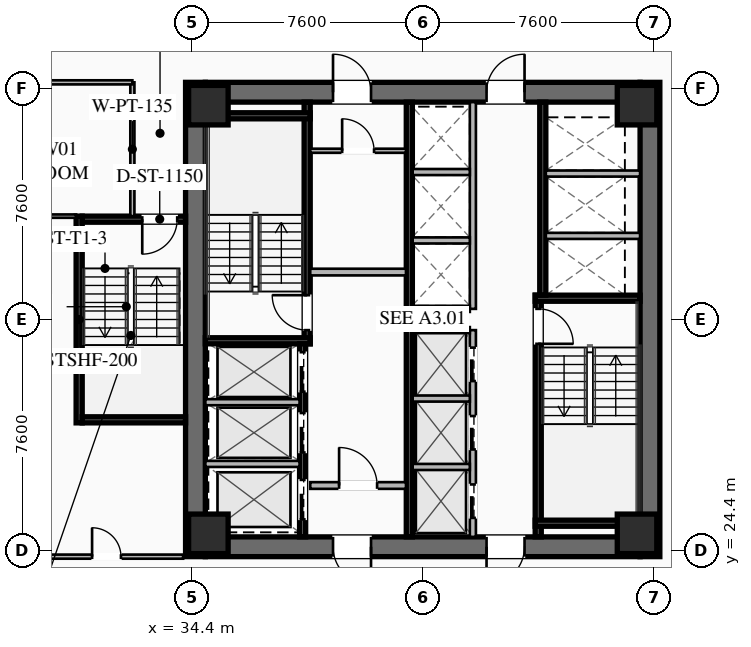
"""IFC4 building model, lengths in metres.
Left out: names, types, materials, properties, quantities, classifications, styles, units other than length and angle.
Written with IfcOpenShell. Run it as: python <this file> out.ifc"""

import sys

from ifc_helpers import new_model, si_unit, direction, frame, frame_2d, origin, origin_2d, place, context, subcontext, project, spatial, rectangle, hollow_rectangle, extrude, element, fill, save


model = new_model("IFC4")
c1 = context("Model", 3, precision=1e-05, world=origin(), true_north=direction((0.0, 1.0)))
c2 = subcontext(c1, "Body", "Model", "MODEL_VIEW")
j1 = project(units=[si_unit("LENGTHUNIT", "METRE"), si_unit("PLANEANGLEUNIT", "RADIAN")], contexts=[c1])
p1 = place(None, origin())
s1 = spatial("IfcSite", under=j1, at=p1, CompositionType="ELEMENT")
p2 = place(p1, origin())
s2 = spatial("IfcBuilding", under=s1, at=p2, CompositionType="ELEMENT")
p3 = place(p2, frame((0.0, 0.0, 77.85)))
s3 = spatial("IfcBuildingStorey", under=s2, at=p3, CompositionType="ELEMENT", Elevation=77.85)
for number, where, z_axis, x_axis in (
    (1, (34.525, 24.2, 0.0), (0.0, 0.0, 1.0), (0.0, 1.0, 0.0)),
    (2, (49.475, 39.8, 0.0), (0.0, 0.0, 1.0), (0.0, -1.0, 0.0)),
):
    element("IfcWall", number, at=place(p3, frame(where, z_axis=z_axis, x_axis=x_axis)), inside=s3, PredefinedType="SHEAR", context=c2, shape_type="SweptSolid", body=[
        extrude(rectangle(XDim=15.6, YDim=0.65, at=frame_2d((7.8, 0.0))), origin(), (0.0, 0.0, 1.0), 3.55),
    ])
p4 = place(p3, frame((49.15, 24.525, 0.0), z_axis=(0.0, 0.0, 1.0), x_axis=(-1.0, 0.0, 0.0)))
e3 = element("IfcWall", 3, at=p4, inside=s3, PredefinedType="SHEAR", context=c2, shape_type="SweptSolid", body=[
    extrude(rectangle(XDim=14.3, YDim=0.65, at=frame_2d((7.15, 0.0))), origin(), (0.0, 0.0, 1.0), 3.55),
])
p5 = place(p4, frame((8.85, 0.0, 0.0)))
e4 = element("IfcOpeningElement", 4, at=p5, cuts=e3, PredefinedType="OPENING", context=c2, shape_type="SweptSolid", body=[
    extrude(rectangle(XDim=1.25, YDim=2.25, at=frame_2d((0.625, 1.125))), frame((0.0, 0.335, 0.0), z_axis=(0.0, -1.0, 0.0), x_axis=(1.0, 0.0, 0.0)), (0.0, 0.0, 1.0), 0.67),
])
p6 = place(p4, frame((3.8, 0.0, 0.0)))
e5 = element("IfcOpeningElement", 5, at=p6, cuts=e3, PredefinedType="OPENING", context=c2, shape_type="SweptSolid", body=[
    extrude(rectangle(XDim=1.25, YDim=2.25, at=frame_2d((0.625, 1.125))), frame((0.0, 0.335, 0.0), z_axis=(0.0, -1.0, 0.0), x_axis=(1.0, 0.0, 0.0)), (0.0, 0.0, 1.0), 0.67),
])
p7 = place(p3, frame((34.85, 39.475, 0.0), z_axis=(0.0, 0.0, 1.0), x_axis=(1.0, 0.0, 0.0)))
e6 = element("IfcWall", 6, at=p7, inside=s3, PredefinedType="SHEAR", context=c2, shape_type="SweptSolid", body=[
    extrude(rectangle(XDim=14.3, YDim=0.65, at=frame_2d((7.15, 0.0))), origin(), (0.0, 0.0, 1.0), 3.55),
])
p8 = place(p7, frame((4.2, 0.0, 0.0)))
e7 = element("IfcOpeningElement", 7, at=p8, cuts=e6, PredefinedType="OPENING", context=c2, shape_type="SweptSolid", body=[
    extrude(rectangle(XDim=1.25, YDim=2.25, at=frame_2d((0.625, 1.125))), frame((0.0, 0.335, 0.0), z_axis=(0.0, -1.0, 0.0), x_axis=(1.0, 0.0, 0.0)), (0.0, 0.0, 1.0), 0.67),
])
p9 = place(p7, frame((9.25, 0.0, 0.0)))
e8 = element("IfcOpeningElement", 8, at=p9, cuts=e6, PredefinedType="OPENING", context=c2, shape_type="SweptSolid", body=[
    extrude(rectangle(XDim=1.25, YDim=2.25, at=frame_2d((0.625, 1.125))), frame((0.0, 0.335, 0.0), z_axis=(0.0, -1.0, 0.0), x_axis=(1.0, 0.0, 0.0)), (0.0, 0.0, 1.0), 0.67),
])
for number, where, z_axis, x_axis in (
    (9, (34.95, 24.95, 0.0), (0.0, 0.0, 1.0), (1.0, 0.0, 0.0)),
    (10, (49.05, 24.95, 0.0), (0.0, 0.0, 1.0), (1.0, 0.0, 0.0)),
    (11, (49.05, 39.05, 0.0), (0.0, 0.0, 1.0), (1.0, 0.0, 0.0)),
    (12, (34.95, 39.05, 0.0), (0.0, 0.0, 1.0), (1.0, 0.0, 0.0)),
):
    element("IfcColumn", number, at=place(p3, frame(where, z_axis=z_axis, x_axis=x_axis)), inside=s3, PredefinedType="COLUMN", context=c2, shape_type="SweptSolid", body=[
        extrude(hollow_rectangle(XDim=1.3, YDim=1.3, WallThickness=0.05, at=origin_2d()), origin(), (0.0, 0.0, 1.0), 3.35),
    ])
p10 = place(p3, frame((38.2, 31.2, 0.0), z_axis=(0.0, 0.0, 1.0), x_axis=(0.0, 1.0, 0.0)))
e13 = element("IfcWall", 13, at=p10, inside=s3, PredefinedType="SHEAR", context=c2, shape_type="SweptSolid", body=[
    extrude(rectangle(XDim=7.95, YDim=0.2, at=frame_2d((3.975, 0.0))), origin(), (0.0, 0.0, 1.0), 3.35),
])
p11 = place(p10, frame((0.45, 0.0, 0.0)))
e14 = element("IfcOpeningElement", 14, at=p11, cuts=e13, PredefinedType="OPENING", context=c2, shape_type="SweptSolid", body=[
    extrude(rectangle(XDim=1.15, YDim=2.2, at=frame_2d((0.575, 1.1))), frame((0.0, 0.11, 0.0), z_axis=(0.0, -1.0, 0.0), x_axis=(1.0, 0.0, 0.0)), (0.0, 0.0, 1.0), 0.22),
])
for number, where, z_axis, x_axis in (
    (15, (34.85, 31.3, 0.0), (0.0, 0.0, 1.0), (1.0, 0.0, 0.0)),
    (16, (34.85, 38.7, 0.0), (0.0, 0.0, 1.0), (1.0, 0.0, 0.0)),
):
    element("IfcWall", number, at=place(p3, frame(where, z_axis=z_axis, x_axis=x_axis)), inside=s3, PredefinedType="SHEAR", context=c2, shape_type="SweptSolid", body=[
        extrude(rectangle(XDim=3.45, YDim=0.2, at=frame_2d((1.725, 0.0))), origin(), (0.0, 0.0, 1.0), 3.35),
    ])
p12 = place(p3, frame((45.8, 32.8, 0.0), z_axis=(0.0, 0.0, 1.0), x_axis=(0.0, -1.0, 0.0)))
e17 = element("IfcWall", 17, at=p12, inside=s3, PredefinedType="SHEAR", context=c2, shape_type="SweptSolid", body=[
    extrude(rectangle(XDim=7.95, YDim=0.2, at=frame_2d((3.975, 0.0))), origin(), (0.0, 0.0, 1.0), 3.35),
])
p13 = place(p12, frame((0.45, 0.0, 0.0)))
e18 = element("IfcOpeningElement", 18, at=p13, cuts=e17, PredefinedType="OPENING", context=c2, shape_type="SweptSolid", body=[
    extrude(rectangle(XDim=1.15, YDim=2.2, at=frame_2d((0.575, 1.1))), frame((0.0, 0.11, 0.0), z_axis=(0.0, -1.0, 0.0), x_axis=(1.0, 0.0, 0.0)), (0.0, 0.0, 1.0), 0.22),
])
for number, where, z_axis, x_axis in (
    (19, (45.7, 32.7, 0.0), (0.0, 0.0, 1.0), (1.0, 0.0, 0.0)),
    (20, (45.7, 25.3, 0.0), (0.0, 0.0, 1.0), (1.0, 0.0, 0.0)),
):
    element("IfcWall", number, at=place(p3, frame(where, z_axis=z_axis, x_axis=x_axis)), inside=s3, PredefinedType="SHEAR", context=c2, shape_type="SweptSolid", body=[
        extrude(rectangle(XDim=3.45, YDim=0.2, at=frame_2d((1.725, 0.0))), origin(), (0.0, 0.0, 1.0), 3.35),
    ])
p14 = place(p3, frame((41.56, 24.85, 0.0), z_axis=(0.0, 0.0, 1.0), x_axis=(0.0, 1.0, 0.0)))
e21 = element("IfcWall", 21, at=p14, inside=s3, PredefinedType="SHEAR", context=c2, shape_type="SweptSolid", body=[
    extrude(rectangle(XDim=14.3, YDim=0.2, at=frame_2d((7.15, 0.0))), origin(), (0.0, 0.0, 1.0), 3.35),
])
p15 = place(p3, frame((38.3, 33.56, 0.0), z_axis=(0.0, 0.0, 1.0), x_axis=(1.0, 0.0, 0.0)))
e22 = element("IfcWall", 22, at=p15, inside=s3, PredefinedType="SOLIDWALL", context=c2, shape_type="SweptSolid", body=[
    extrude(rectangle(XDim=3.15, YDim=0.22, at=frame_2d((1.575, 0.0))), origin(), (0.0, 0.0, 1.0), 2.703),
])
p16 = place(p3, frame((38.3, 26.54, 0.0), z_axis=(0.0, 0.0, 1.0), x_axis=(1.0, 0.0, 0.0)))
e23 = element("IfcWall", 23, at=p16, inside=s3, PredefinedType="SOLIDWALL", context=c2, shape_type="SweptSolid", body=[
    extrude(rectangle(XDim=3.15, YDim=0.22, at=frame_2d((1.575, 0.0))), origin(), (0.0, 0.0, 1.0), 2.703),
])
p17 = place(p16, frame((0.95, 0.0, 0.0)))
e24 = element("IfcOpeningElement", 24, at=p17, cuts=e23, PredefinedType="OPENING", context=c2, shape_type="SweptSolid", body=[
    extrude(rectangle(XDim=1.25, YDim=2.25, at=frame_2d((0.625, 1.125))), frame((0.0, 0.12, 0.0), z_axis=(0.0, -1.0, 0.0), x_axis=(1.0, 0.0, 0.0)), (0.0, 0.0, 1.0), 0.24),
])
p18 = place(p3, frame((38.05, 24.85, 0.0), z_axis=(0.0, 0.0, 1.0), x_axis=(0.0, 1.0, 0.0)))
e25 = element("IfcWall", 25, at=p18, inside=s3, PredefinedType="SHEAR", context=c2, shape_type="SweptSolid", body=[
    extrude(rectangle(XDim=6.35, YDim=0.2, at=frame_2d((3.175, 0.0))), origin(), (0.0, 0.0, 1.0), 3.35),
])
p19 = place(p18, frame((4.775, 0.0, 0.0)))
e26 = element("IfcOpeningElement", 26, at=p19, cuts=e25, PredefinedType="OPENING", context=c2, shape_type="SweptSolid", body=[
    extrude(rectangle(XDim=1.3, YDim=2.25, at=frame_2d((0.65, 1.125))), frame((0.0, 0.11, 0.0), z_axis=(0.0, -1.0, 0.0), x_axis=(1.0, 0.0, 0.0)), (0.0, 0.0, 1.0), 0.22),
])
p20 = place(p18, frame((2.775, 0.0, 0.0)))
e27 = element("IfcOpeningElement", 27, at=p20, cuts=e25, PredefinedType="OPENING", context=c2, shape_type="SweptSolid", body=[
    extrude(rectangle(XDim=1.3, YDim=2.25, at=frame_2d((0.65, 1.125))), frame((0.0, 0.11, 0.0), z_axis=(0.0, -1.0, 0.0), x_axis=(1.0, 0.0, 0.0)), (0.0, 0.0, 1.0), 0.22),
])
p21 = place(p18, frame((0.575, 0.0, 0.0)))
e28 = element("IfcOpeningElement", 28, at=p21, cuts=e25, PredefinedType="OPENING", context=c2, shape_type="SweptSolid", body=[
    extrude(rectangle(XDim=1.3, YDim=2.25, at=frame_2d((0.65, 1.125))), frame((0.0, 0.11, 0.0), z_axis=(0.0, -1.0, 0.0), x_axis=(1.0, 0.0, 0.0)), (0.0, 0.0, 1.0), 0.22),
])
for number, where, z_axis, x_axis in (
    (29, (34.85, 27.25, 0.0), (0.0, 0.0, 1.0), (1.0, 0.0, 0.0)),
    (30, (34.85, 29.28, 0.0), (0.0, 0.0, 1.0), (1.0, 0.0, 0.0)),
):
    element("IfcWall", number, at=place(p3, frame(where, z_axis=z_axis, x_axis=x_axis)), inside=s3, PredefinedType="SOLIDWALL", context=c2, shape_type="SweptSolid", body=[
        extrude(rectangle(XDim=3.1, YDim=0.2, at=frame_2d((1.55, 0.0))), origin(), (0.0, 0.0, 1.0), 3.35),
    ])
p22 = place(p3, frame((45.95, 39.15, 0.0), z_axis=(0.0, 0.0, 1.0), x_axis=(0.0, -1.0, 0.0)))
e31 = element("IfcWall", 31, at=p22, inside=s3, PredefinedType="SHEAR", context=c2, shape_type="SweptSolid", body=[
    extrude(rectangle(XDim=6.35, YDim=0.2, at=frame_2d((3.175, 0.0))), origin(), (0.0, 0.0, 1.0), 3.35),
])
for number, where, z_axis, x_axis in (
    (32, (46.05, 34.75, 0.0), (0.0, 0.0, 1.0), (1.0, 0.0, 0.0)),
    (33, (46.05, 36.8, 0.0), (0.0, 0.0, 1.0), (1.0, 0.0, 0.0)),
):
    element("IfcWall", number, at=place(p3, frame(where, z_axis=z_axis, x_axis=x_axis)), inside=s3, PredefinedType="SOLIDWALL", context=c2, shape_type="SweptSolid", body=[
        extrude(rectangle(XDim=3.1, YDim=0.2, at=frame_2d((1.55, 0.0))), origin(), (0.0, 0.0, 1.0), 3.35),
    ])
p23 = place(p3, frame((38.3, 37.55, 0.0), z_axis=(0.0, 0.0, 1.0), x_axis=(1.0, 0.0, 0.0)))
e34 = element("IfcWall", 34, at=p23, inside=s3, PredefinedType="PARTITIONING", context=c2, shape_type="SweptSolid", body=[
    extrude(rectangle(XDim=3.15, YDim=0.135, at=frame_2d((1.575, 0.0))), origin(), (0.0, 0.0, 1.0), 2.703),
])
p24 = place(p23, frame((1.05, 0.0, 0.0)))
e35 = element("IfcOpeningElement", 35, at=p24, cuts=e34, PredefinedType="OPENING", context=c2, shape_type="SweptSolid", body=[
    extrude(rectangle(XDim=1.05, YDim=2.2, at=frame_2d((0.525, 1.1))), frame((0.0, 0.077, 0.0), z_axis=(0.0, -1.0, 0.0), x_axis=(1.0, 0.0, 0.0)), (0.0, 0.0, 1.0), 0.155),
])
p25 = place(p3, frame((43.65, 24.85, 0.0), z_axis=(0.0, 0.0, 1.0), x_axis=(0.0, 1.0, 0.0)))
e36 = element("IfcWall", 36, at=p25, inside=s3, PredefinedType="SOLIDWALL", context=c2, shape_type="SweptSolid", body=[
    extrude(rectangle(XDim=6.8, YDim=0.2, at=frame_2d((3.4, 0.0))), origin(), (0.0, 0.0, 1.0), 3.35),
])
p26 = place(p25, frame((0.625, 0.0, 0.0)))
e37 = element("IfcOpeningElement", 37, at=p26, cuts=e36, PredefinedType="OPENING", context=c2, shape_type="SweptSolid", body=[
    extrude(rectangle(XDim=1.1, YDim=2.2, at=frame_2d((0.55, 1.1))), frame((0.0, 0.11, 0.0), z_axis=(0.0, -1.0, 0.0), x_axis=(1.0, 0.0, 0.0)), (0.0, 0.0, 1.0), 0.22),
])
p27 = place(p25, frame((2.875, 0.0, 0.0)))
e38 = element("IfcOpeningElement", 38, at=p27, cuts=e36, PredefinedType="OPENING", context=c2, shape_type="SweptSolid", body=[
    extrude(rectangle(XDim=1.1, YDim=2.2, at=frame_2d((0.55, 1.1))), frame((0.0, 0.11, 0.0), z_axis=(0.0, -1.0, 0.0), x_axis=(1.0, 0.0, 0.0)), (0.0, 0.0, 1.0), 0.22),
])
p28 = place(p25, frame((5.125, 0.0, 0.0)))
e39 = element("IfcOpeningElement", 39, at=p28, cuts=e36, PredefinedType="OPENING", context=c2, shape_type="SweptSolid", body=[
    extrude(rectangle(XDim=1.1, YDim=2.2, at=frame_2d((0.55, 1.1))), frame((0.0, 0.11, 0.0), z_axis=(0.0, -1.0, 0.0), x_axis=(1.0, 0.0, 0.0)), (0.0, 0.0, 1.0), 0.22),
])
for number, where, z_axis, x_axis in (
    (40, (41.67, 27.15, 0.0), (0.0, 0.0, 1.0), (1.0, 0.0, 0.0)),
    (41, (41.67, 29.4, 0.0), (0.0, 0.0, 1.0), (1.0, 0.0, 0.0)),
    (42, (41.67, 31.65, 0.0), (0.0, 0.0, 1.0), (1.0, 0.0, 0.0)),
):
    element("IfcWall", number, at=place(p3, frame(where, z_axis=z_axis, x_axis=x_axis)), inside=s3, PredefinedType="SOLIDWALL", context=c2, shape_type="SweptSolid", body=[
        extrude(rectangle(XDim=1.88, YDim=0.2, at=frame_2d((0.94, 0.0))), origin(), (0.0, 0.0, 1.0), 3.35),
    ])
p29 = place(p3, frame((43.65, 32.35, 0.0), z_axis=(0.0, 0.0, 1.0), x_axis=(0.0, 1.0, 0.0)))
e43 = element("IfcWall", 43, at=p29, inside=s3, PredefinedType="SOLIDWALL", context=c2, shape_type="SweptSolid", body=[
    extrude(rectangle(XDim=6.8, YDim=0.2, at=frame_2d((3.4, 0.0))), origin(), (0.0, 0.0, 1.0), 3.35),
])
for number, where, z_axis, x_axis in (
    (44, (41.67, 32.35, 0.0), (0.0, 0.0, 1.0), (1.0, 0.0, 0.0)),
    (45, (41.67, 34.6, 0.0), (0.0, 0.0, 1.0), (1.0, 0.0, 0.0)),
    (46, (41.67, 36.85, 0.0), (0.0, 0.0, 1.0), (1.0, 0.0, 0.0)),
):
    element("IfcWall", number, at=place(p3, frame(where, z_axis=z_axis, x_axis=x_axis)), inside=s3, PredefinedType="SOLIDWALL", context=c2, shape_type="SweptSolid", body=[
        extrude(rectangle(XDim=1.88, YDim=0.2, at=frame_2d((0.94, 0.0))), origin(), (0.0, 0.0, 1.0), 3.35),
    ])
p30 = place(p3, frame((30.7, 28.6, 0.0), z_axis=(0.0, 0.0, 1.0), x_axis=(0.0, 1.0, 0.0)))
e47 = element("IfcWall", 47, at=p30, inside=s3, PredefinedType="SHEAR", context=c2, shape_type="SweptSolid", body=[
    extrude(rectangle(XDim=6.8, YDim=0.2, at=frame_2d((3.4, 0.0))), origin(), (0.0, 0.0, 1.0), 3.35),
])
p31 = place(p3, frame((34.2, 35.3, 0.0), z_axis=(0.0, 0.0, 1.0), x_axis=(-1.0, 0.0, 0.0)))
e48 = element("IfcWall", 48, at=p31, inside=s3, PredefinedType="SHEAR", context=c2, shape_type="SweptSolid", body=[
    extrude(rectangle(XDim=3.4, YDim=0.2, at=frame_2d((1.7, 0.0))), origin(), (0.0, 0.0, 1.0), 3.35),
])
p32 = place(p31, frame((0.275, 0.0, 0.0)))
e49 = element("IfcOpeningElement", 49, at=p32, cuts=e48, PredefinedType="OPENING", context=c2, shape_type="SweptSolid", body=[
    extrude(rectangle(XDim=1.15, YDim=2.2, at=frame_2d((0.575, 1.1))), frame((0.0, 0.11, 0.0), z_axis=(0.0, -1.0, 0.0), x_axis=(1.0, 0.0, 0.0)), (0.0, 0.0, 1.0), 0.22),
])
p33 = place(p3, frame((30.8, 28.7, 0.0), z_axis=(0.0, 0.0, 1.0), x_axis=(1.0, 0.0, 0.0)))
e50 = element("IfcWall", 50, at=p33, inside=s3, PredefinedType="SHEAR", context=c2, shape_type="SweptSolid", body=[
    extrude(rectangle(XDim=3.4, YDim=0.2, at=frame_2d((1.7, 0.0))), origin(), (0.0, 0.0, 1.0), 3.35),
])
p34 = place(p3, frame((32.45, 35.4, 0.0), z_axis=(0.0, 0.0, 1.0), x_axis=(0.0, 1.0, 0.0)))
e51 = element("IfcWall", 51, at=p34, inside=s3, PredefinedType="PARTITIONING", context=c2, shape_type="SweptSolid", body=[
    extrude(rectangle(XDim=4.4, YDim=0.135, at=frame_2d((2.2, 0.0))), origin(), (0.0, 0.0, 1.0), 2.703),
])
p35 = place(p3, frame((32.45, 39.8, 0.0), z_axis=(0.0, 0.0, 1.0), x_axis=(-1.0, 0.0, 0.0)))
e52 = element("IfcWall", 52, at=p35, inside=s3, PredefinedType="PARTITIONING", context=c2, shape_type="SweptSolid", body=[
    extrude(rectangle(XDim=11.43, YDim=0.135, at=frame_2d((5.715, 0.0))), origin(), (0.0, 0.0, 1.0), 2.703),
])
p36 = place(p35, frame((4.89, 0.0, 0.0)))
e53 = element("IfcOpeningElement", 53, at=p36, cuts=e52, PredefinedType="OPENING", context=c2, shape_type="SweptSolid", body=[
    extrude(rectangle(XDim=0.95, YDim=2.05, at=frame_2d((0.475, 1.025))), frame((0.0, 0.077, 0.0), z_axis=(0.0, -1.0, 0.0), x_axis=(1.0, 0.0, 0.0)), (0.0, 0.0, 1.0), 0.155),
])
p37 = place(p3, frame((21.02, 24.2, 0.0), z_axis=(0.0, 0.0, 1.0), x_axis=(1.0, 0.0, 0.0)))
e54 = element("IfcWall", 54, at=p37, inside=s3, PredefinedType="PARTITIONING", context=c2, shape_type="SweptSolid", body=[
    extrude(rectangle(XDim=13.1, YDim=0.135, at=frame_2d((6.55, 0.0))), origin(), (0.0, 0.0, 1.0), 2.703),
])
p38 = place(p37, frame((10.105, 0.0, 0.0)))
e55 = element("IfcOpeningElement", 55, at=p38, cuts=e54, PredefinedType="OPENING", context=c2, shape_type="SweptSolid", body=[
    extrude(rectangle(XDim=0.95, YDim=2.05, at=frame_2d((0.475, 1.025))), frame((0.0, 0.077, 0.0), z_axis=(0.0, -1.0, 0.0), x_axis=(1.0, 0.0, 0.0)), (0.0, 0.0, 1.0), 0.155),
])
p39 = place(p3, frame((30.6, 35.4, 0.0), z_axis=(0.0, 0.0, 1.0), x_axis=(-1.0, 0.0, 0.0)))
e56 = element("IfcWall", 56, at=p39, inside=s3, PredefinedType="PARTITIONING", context=c2, shape_type="SweptSolid", body=[
    extrude(rectangle(XDim=9.58, YDim=0.11, at=frame_2d((4.79, 0.0))), origin(), (0.0, 0.0, 1.0), 2.703),
])
p40 = place(p8, origin())
e57 = element("IfcDoor", 57, at=p40, inside=s3, OperationType="SINGLE_SWING_LEFT", PredefinedType="DOOR", context=c2, shape_type="SweptSolid", body=[
    extrude(rectangle(XDim=1.25, YDim=2.25, at=frame_2d((0.625, 1.125))), frame((0.0, 0.025, 0.0), z_axis=(0.0, -1.0, 0.0), x_axis=(1.0, 0.0, 0.0)), (0.0, 0.0, 1.0), 0.05),
])
fill(e7, e57)
p41 = place(p9, origin())
e58 = element("IfcDoor", 58, at=p41, inside=s3, OperationType="SINGLE_SWING_RIGHT", PredefinedType="DOOR", context=c2, shape_type="SweptSolid", body=[
    extrude(rectangle(XDim=1.25, YDim=2.25, at=frame_2d((0.625, 1.125))), frame((0.0, 0.025, 0.0), z_axis=(0.0, -1.0, 0.0), x_axis=(1.0, 0.0, 0.0)), (0.0, 0.0, 1.0), 0.05),
])
fill(e8, e58)
p42 = place(p5, origin())
e59 = element("IfcDoor", 59, at=p42, inside=s3, OperationType="SINGLE_SWING_LEFT", PredefinedType="DOOR", context=c2, shape_type="SweptSolid", body=[
    extrude(rectangle(XDim=1.25, YDim=2.25, at=frame_2d((0.625, 1.125))), frame((0.0, 0.025, 0.0), z_axis=(0.0, -1.0, 0.0), x_axis=(1.0, 0.0, 0.0)), (0.0, 0.0, 1.0), 0.05),
])
fill(e4, e59)
p43 = place(p6, origin())
e60 = element("IfcDoor", 60, at=p43, inside=s3, OperationType="SINGLE_SWING_RIGHT", PredefinedType="DOOR", context=c2, shape_type="SweptSolid", body=[
    extrude(rectangle(XDim=1.25, YDim=2.25, at=frame_2d((0.625, 1.125))), frame((0.0, 0.025, 0.0), z_axis=(0.0, -1.0, 0.0), x_axis=(1.0, 0.0, 0.0)), (0.0, 0.0, 1.0), 0.05),
])
fill(e5, e60)
p44 = place(p11, origin())
e61 = element("IfcDoor", 61, at=p44, inside=s3, OperationType="SINGLE_SWING_RIGHT", PredefinedType="DOOR", context=c2, shape_type="SweptSolid", body=[
    extrude(rectangle(XDim=1.15, YDim=2.2, at=frame_2d((0.575, 1.1))), frame((0.0, 0.025, 0.0), z_axis=(0.0, -1.0, 0.0), x_axis=(1.0, 0.0, 0.0)), (0.0, 0.0, 1.0), 0.05),
])
fill(e14, e61)
p45 = place(p13, origin())
e62 = element("IfcDoor", 62, at=p45, inside=s3, OperationType="SINGLE_SWING_RIGHT", PredefinedType="DOOR", context=c2, shape_type="SweptSolid", body=[
    extrude(rectangle(XDim=1.15, YDim=2.2, at=frame_2d((0.575, 1.1))), frame((0.0, 0.025, 0.0), z_axis=(0.0, -1.0, 0.0), x_axis=(1.0, 0.0, 0.0)), (0.0, 0.0, 1.0), 0.05),
])
fill(e18, e62)
p46 = place(p17, origin())
e63 = element("IfcDoor", 63, at=p46, inside=s3, OperationType="SINGLE_SWING_LEFT", PredefinedType="DOOR", context=c2, shape_type="SweptSolid", body=[
    extrude(rectangle(XDim=1.25, YDim=2.25, at=frame_2d((0.625, 1.125))), frame((0.0, 0.025, 0.0), z_axis=(0.0, -1.0, 0.0), x_axis=(1.0, 0.0, 0.0)), (0.0, 0.0, 1.0), 0.05),
])
fill(e24, e63)
p47 = place(p24, origin())
e64 = element("IfcDoor", 64, at=p47, inside=s3, OperationType="SINGLE_SWING_LEFT", PredefinedType="DOOR", context=c2, shape_type="SweptSolid", body=[
    extrude(rectangle(XDim=1.05, YDim=2.2, at=frame_2d((0.525, 1.1))), frame((0.0, 0.025, 0.0), z_axis=(0.0, -1.0, 0.0), x_axis=(1.0, 0.0, 0.0)), (0.0, 0.0, 1.0), 0.05),
])
fill(e35, e64)
p48 = place(p32, origin())
e65 = element("IfcDoor", 65, at=p48, inside=s3, OperationType="SINGLE_SWING_RIGHT", PredefinedType="DOOR", context=c2, shape_type="SweptSolid", body=[
    extrude(rectangle(XDim=1.15, YDim=2.2, at=frame_2d((0.575, 1.1))), frame((0.0, 0.025, 0.0), z_axis=(0.0, -1.0, 0.0), x_axis=(1.0, 0.0, 0.0)), (0.0, 0.0, 1.0), 0.05),
])
fill(e49, e65)
p49 = place(p38, origin())
e66 = element("IfcDoor", 66, at=p49, inside=s3, OperationType="SINGLE_SWING_LEFT", PredefinedType="DOOR", context=c2, shape_type="SweptSolid", body=[
    extrude(rectangle(XDim=0.95, YDim=2.05, at=frame_2d((0.475, 1.025))), frame((0.0, 0.025, 0.0), z_axis=(0.0, -1.0, 0.0), x_axis=(1.0, 0.0, 0.0)), (0.0, 0.0, 1.0), 0.05),
])
fill(e55, e66)
p50 = place(p19, origin())
e67 = element("IfcDoor", 67, at=p50, inside=s3, OperationType="SLIDING_TO_LEFT", PredefinedType="DOOR", context=c2, shape_type="SweptSolid", body=[
    extrude(rectangle(XDim=1.3, YDim=2.25, at=frame_2d((0.65, 1.125))), frame((0.0, 0.025, 0.0), z_axis=(0.0, -1.0, 0.0), x_axis=(1.0, 0.0, 0.0)), (0.0, 0.0, 1.0), 0.05),
])
fill(e26, e67)
p51 = place(p20, origin())
e68 = element("IfcDoor", 68, at=p51, inside=s3, OperationType="SLIDING_TO_LEFT", PredefinedType="DOOR", context=c2, shape_type="SweptSolid", body=[
    extrude(rectangle(XDim=1.3, YDim=2.25, at=frame_2d((0.65, 1.125))), frame((0.0, 0.025, 0.0), z_axis=(0.0, -1.0, 0.0), x_axis=(1.0, 0.0, 0.0)), (0.0, 0.0, 1.0), 0.05),
])
fill(e27, e68)
p52 = place(p21, origin())
e69 = element("IfcDoor", 69, at=p52, inside=s3, OperationType="SLIDING_TO_LEFT", PredefinedType="DOOR", context=c2, shape_type="SweptSolid", body=[
    extrude(rectangle(XDim=1.3, YDim=2.25, at=frame_2d((0.65, 1.125))), frame((0.0, 0.025, 0.0), z_axis=(0.0, -1.0, 0.0), x_axis=(1.0, 0.0, 0.0)), (0.0, 0.0, 1.0), 0.05),
])
fill(e28, e69)
p53 = place(p26, origin())
e70 = element("IfcDoor", 70, at=p53, inside=s3, OperationType="SLIDING_TO_LEFT", PredefinedType="DOOR", context=c2, shape_type="SweptSolid", body=[
    extrude(rectangle(XDim=1.1, YDim=2.2, at=frame_2d((0.55, 1.1))), frame((0.0, 0.025, 0.0), z_axis=(0.0, -1.0, 0.0), x_axis=(1.0, 0.0, 0.0)), (0.0, 0.0, 1.0), 0.05),
])
fill(e37, e70)
p54 = place(p27, origin())
e71 = element("IfcDoor", 71, at=p54, inside=s3, OperationType="SLIDING_TO_LEFT", PredefinedType="DOOR", context=c2, shape_type="SweptSolid", body=[
    extrude(rectangle(XDim=1.1, YDim=2.2, at=frame_2d((0.55, 1.1))), frame((0.0, 0.025, 0.0), z_axis=(0.0, -1.0, 0.0), x_axis=(1.0, 0.0, 0.0)), (0.0, 0.0, 1.0), 0.05),
])
fill(e38, e71)
p55 = place(p28, origin())
e72 = element("IfcDoor", 72, at=p55, inside=s3, OperationType="SLIDING_TO_LEFT", PredefinedType="DOOR", context=c2, shape_type="SweptSolid", body=[
    extrude(rectangle(XDim=1.1, YDim=2.2, at=frame_2d((0.55, 1.1))), frame((0.0, 0.025, 0.0), z_axis=(0.0, -1.0, 0.0), x_axis=(1.0, 0.0, 0.0)), (0.0, 0.0, 1.0), 0.05),
])
fill(e39, e72)
save(model, sys.argv[1])
